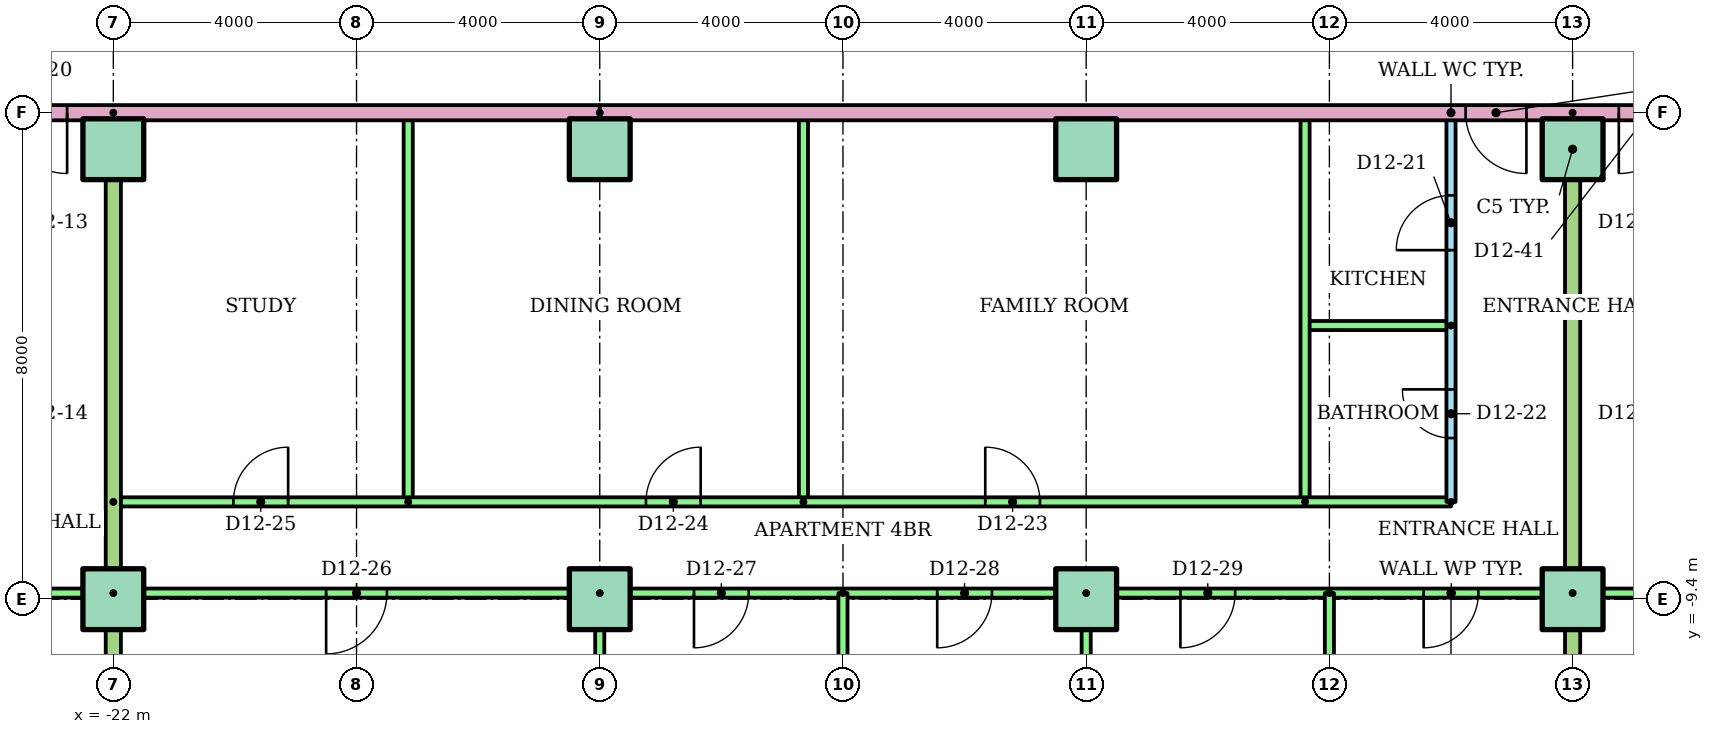
"""IFC4 building model, lengths in metres.
Left out: names, types, materials, properties, quantities, classifications, styles, units other than length and angle.
Written with IfcOpenShell. Run it as: python <this file> out.ifc"""

import sys

from ifc_helpers import new_model, si_unit, direction, frame, frame_2d, origin, origin_2d, place, context, subcontext, project, spatial, rectangle, extrude, element, fill, save


model = new_model("IFC4")
c1 = context("Model", 3, precision=1e-05, world=origin(), true_north=direction((0.0, 1.0)))
c2 = subcontext(c1, "Body", "Model", "MODEL_VIEW")
j1 = project(units=[si_unit("LENGTHUNIT", "METRE"), si_unit("PLANEANGLEUNIT", "RADIAN")], contexts=[c1])
p1 = place(None, origin())
s1 = spatial("IfcSite", under=j1, at=p1, CompositionType="ELEMENT")
p2 = place(p1, origin())
s2 = spatial("IfcBuilding", under=s1, at=p2, CompositionType="ELEMENT")
p3 = place(p2, frame((0.0, 0.0, 48.0)))
s3 = spatial("IfcBuildingStorey", under=s2, at=p3, CompositionType="ELEMENT", Elevation=48.0)
for number, where in (
    (1, (-22.0, -9.4, 0.0)),
    (2, (-14.0, -9.4, 0.0)),
    (3, (-6.0, -9.4, 0.0)),
    (4, (2.0, -9.4, 0.0)),
    (5, (-22.0, -2.0, 0.0)),
    (6, (-14.0, -2.0, 0.0)),
    (7, (-6.0, -2.0, 0.0)),
    (8, (2.0, -2.0, 0.0)),
):
    element("IfcColumn", number, at=place(p3, frame(where)), inside=s3, PredefinedType="COLUMN", context=c2, shape_type="SweptSolid", body=[
        extrude(rectangle(XDim=1.0, YDim=1.0, at=origin_2d()), origin(), (0.0, 0.0, 1.0), 3.2),
    ])
p4 = place(p3, frame((-22.0, -9.3, 0.0), z_axis=(0.0, 0.0, 1.0), x_axis=(-1.0, 0.0, 0.0)))
e9 = element("IfcWall", 9, at=p4, inside=s3, PredefinedType="PARTITIONING", context=c2, shape_type="SweptSolid", body=[
    extrude(rectangle(XDim=14.51, YDim=0.15, at=frame_2d((7.255, 0.0))), origin(), (0.0, 0.0, 1.0), 2.4),
])
p5 = place(p4, frame((11.6, 0.0, 0.0)))
e10 = element("IfcOpeningElement", 10, at=p5, cuts=e9, PredefinedType="OPENING", context=c2, shape_type="SweptSolid", body=[
    extrude(rectangle(XDim=0.9, YDim=2.1, at=frame_2d((0.45, 1.05))), frame((0.0, 0.085, 0.0), z_axis=(0.0, -1.0, 0.0), x_axis=(1.0, 0.0, 0.0)), (0.0, 0.0, 1.0), 0.17),
])
p6 = place(p4, frame((6.34, 0.0, 0.0)))
e11 = element("IfcOpeningElement", 11, at=p6, cuts=e9, PredefinedType="OPENING", context=c2, shape_type="SweptSolid", body=[
    extrude(rectangle(XDim=0.9, YDim=2.1, at=frame_2d((0.45, 1.05))), frame((0.0, 0.085, 0.0), z_axis=(0.0, -1.0, 0.0), x_axis=(1.0, 0.0, 0.0)), (0.0, 0.0, 1.0), 0.17),
])
p7 = place(p4, frame((1.5, 0.0, 0.0)))
e12 = element("IfcOpeningElement", 12, at=p7, cuts=e9, PredefinedType="OPENING", context=c2, shape_type="SweptSolid", body=[
    extrude(rectangle(XDim=1.0, YDim=2.1, at=frame_2d((0.5, 1.05))), frame((0.0, 0.085, 0.0), z_axis=(0.0, -1.0, 0.0), x_axis=(1.0, 0.0, 0.0)), (0.0, 0.0, 1.0), 0.17),
])
p8 = place(p3, frame((0.0, -7.8, 0.0), z_axis=(0.0, 0.0, 1.0), x_axis=(0.0, 1.0, 0.0)))
e13 = element("IfcWall", 13, at=p8, inside=s3, PredefinedType="PARTITIONING", context=c2, shape_type="SweptSolid", body=[
    extrude(rectangle(XDim=6.4, YDim=0.15, at=frame_2d((3.2, 0.0))), origin(), (0.0, 0.0, 1.0), 2.4),
])
p9 = place(p8, frame((4.14, 0.0, 0.0)))
e14 = element("IfcOpeningElement", 14, at=p9, cuts=e13, PredefinedType="OPENING", context=c2, shape_type="SweptSolid", body=[
    extrude(rectangle(XDim=0.9, YDim=2.1, at=frame_2d((0.45, 1.05))), frame((0.0, 0.085, 0.0), z_axis=(0.0, -1.0, 0.0), x_axis=(1.0, 0.0, 0.0)), (0.0, 0.0, 1.0), 0.17),
])
p10 = place(p8, frame((1.05, 0.0, 0.0)))
e15 = element("IfcOpeningElement", 15, at=p10, cuts=e13, PredefinedType="OPENING", context=c2, shape_type="SweptSolid", body=[
    extrude(rectangle(XDim=0.8, YDim=2.1, at=frame_2d((0.4, 1.05))), frame((0.0, 0.085, 0.0), z_axis=(0.0, -1.0, 0.0), x_axis=(1.0, 0.0, 0.0)), (0.0, 0.0, 1.0), 0.17),
])
p11 = place(p3, frame((0.0, -4.9, 0.0), z_axis=(0.0, 0.0, 1.0), x_axis=(-1.0, 0.0, 0.0)))
e16 = element("IfcWall", 16, at=p11, inside=s3, PredefinedType="PARTITIONING", context=c2, shape_type="SweptSolid", body=[
    extrude(rectangle(XDim=2.4, YDim=0.15, at=frame_2d((1.2, 0.0))), origin(), (0.0, 0.0, 1.0), 2.4),
])
for number, where, z_axis, x_axis in (
    (17, (-2.4, -7.8, 0.0), (0.0, 0.0, 1.0), (0.0, 1.0, 0.0)),
    (18, (-10.65, -7.8, 0.0), (0.0, 0.0, 1.0), (0.0, 1.0, 0.0)),
    (19, (-17.15, -7.8, 0.0), (0.0, 0.0, 1.0), (0.0, 1.0, 0.0)),
):
    element("IfcWall", number, at=place(p3, frame(where, z_axis=z_axis, x_axis=x_axis)), inside=s3, PredefinedType="PARTITIONING", context=c2, shape_type="SweptSolid", body=[
        extrude(rectangle(XDim=6.4, YDim=0.15, at=frame_2d((3.2, 0.0))), origin(), (0.0, 0.0, 1.0), 2.4),
    ])
p12 = place(p3, frame((-22.0, -7.8, 0.0)))
e20 = element("IfcWall", 20, at=p12, inside=s3, PredefinedType="PARTITIONING", context=c2, shape_type="SweptSolid", body=[
    extrude(rectangle(XDim=22.0, YDim=0.15, at=frame_2d((11.0, 0.0))), origin(), (0.0, 0.0, 1.0), 2.4),
])
p13 = place(p12, frame((14.34, 0.0, 0.0)))
e21 = element("IfcOpeningElement", 21, at=p13, cuts=e20, PredefinedType="OPENING", context=c2, shape_type="SweptSolid", body=[
    extrude(rectangle(XDim=0.9, YDim=2.1, at=frame_2d((0.45, 1.05))), frame((0.0, 0.085, 0.0), z_axis=(0.0, -1.0, 0.0), x_axis=(1.0, 0.0, 0.0)), (0.0, 0.0, 1.0), 0.17),
])
p14 = place(p12, frame((8.76, 0.0, 0.0)))
e22 = element("IfcOpeningElement", 22, at=p14, cuts=e20, PredefinedType="OPENING", context=c2, shape_type="SweptSolid", body=[
    extrude(rectangle(XDim=0.9, YDim=2.1, at=frame_2d((0.45, 1.05))), frame((0.0, 0.085, 0.0), z_axis=(0.0, -1.0, 0.0), x_axis=(1.0, 0.0, 0.0)), (0.0, 0.0, 1.0), 0.17),
])
p15 = place(p12, frame((1.975, 0.0, 0.0)))
e23 = element("IfcOpeningElement", 23, at=p15, cuts=e20, PredefinedType="OPENING", context=c2, shape_type="SweptSolid", body=[
    extrude(rectangle(XDim=0.9, YDim=2.1, at=frame_2d((0.45, 1.05))), frame((0.0, 0.085, 0.0), z_axis=(0.0, -1.0, 0.0), x_axis=(1.0, 0.0, 0.0)), (0.0, 0.0, 1.0), 0.17),
])
p16 = place(p3, frame((2.0, -9.3, 0.0), z_axis=(0.0, 0.0, 1.0), x_axis=(-1.0, 0.0, 0.0)))
e24 = element("IfcWall", 24, at=p16, inside=s3, PredefinedType="PARTITIONING", context=c2, shape_type="SweptSolid", body=[
    extrude(rectangle(XDim=24.0, YDim=0.15, at=frame_2d((12.0, 0.0))), origin(), (0.0, 0.0, 1.0), 2.4),
])
p17 = place(p16, frame((19.5, 0.0, 0.0)))
e25 = element("IfcOpeningElement", 25, at=p17, cuts=e24, PredefinedType="OPENING", context=c2, shape_type="SweptSolid", body=[
    extrude(rectangle(XDim=1.0, YDim=2.1, at=frame_2d((0.5, 1.05))), frame((0.0, 0.085, 0.0), z_axis=(0.0, -1.0, 0.0), x_axis=(1.0, 0.0, 0.0)), (0.0, 0.0, 1.0), 0.17),
])
p18 = place(p16, frame((13.55, 0.0, 0.0)))
e26 = element("IfcOpeningElement", 26, at=p18, cuts=e24, PredefinedType="OPENING", context=c2, shape_type="SweptSolid", body=[
    extrude(rectangle(XDim=0.9, YDim=2.1, at=frame_2d((0.45, 1.05))), frame((0.0, 0.085, 0.0), z_axis=(0.0, -1.0, 0.0), x_axis=(1.0, 0.0, 0.0)), (0.0, 0.0, 1.0), 0.17),
])
p19 = place(p16, frame((9.55, 0.0, 0.0)))
e27 = element("IfcOpeningElement", 27, at=p19, cuts=e24, PredefinedType="OPENING", context=c2, shape_type="SweptSolid", body=[
    extrude(rectangle(XDim=0.9, YDim=2.1, at=frame_2d((0.45, 1.05))), frame((0.0, 0.085, 0.0), z_axis=(0.0, -1.0, 0.0), x_axis=(1.0, 0.0, 0.0)), (0.0, 0.0, 1.0), 0.17),
])
p20 = place(p16, frame((5.55, 0.0, 0.0)))
e28 = element("IfcOpeningElement", 28, at=p20, cuts=e24, PredefinedType="OPENING", context=c2, shape_type="SweptSolid", body=[
    extrude(rectangle(XDim=0.9, YDim=2.1, at=frame_2d((0.45, 1.05))), frame((0.0, 0.085, 0.0), z_axis=(0.0, -1.0, 0.0), x_axis=(1.0, 0.0, 0.0)), (0.0, 0.0, 1.0), 0.17),
])
p21 = place(p16, frame((1.55, 0.0, 0.0)))
e29 = element("IfcOpeningElement", 29, at=p21, cuts=e24, PredefinedType="OPENING", context=c2, shape_type="SweptSolid", body=[
    extrude(rectangle(XDim=0.9, YDim=2.1, at=frame_2d((0.45, 1.05))), frame((0.0, 0.085, 0.0), z_axis=(0.0, -1.0, 0.0), x_axis=(1.0, 0.0, 0.0)), (0.0, 0.0, 1.0), 0.17),
])
p22 = place(p3, frame((-14.0, -9.3, 0.0), z_axis=(0.0, 0.0, 1.0), x_axis=(0.0, -1.0, 0.0)))
e30 = element("IfcWall", 30, at=p22, inside=s3, PredefinedType="PARTITIONING", context=c2, shape_type="SweptSolid", body=[
    extrude(rectangle(XDim=6.81, YDim=0.15, at=frame_2d((3.405, 0.0))), origin(), (0.0, 0.0, 1.0), 2.4),
])
p23 = place(p3, frame((-10.0, -9.3, 0.0), z_axis=(0.0, 0.0, 1.0), x_axis=(0.0, -1.0, 0.0)))
e31 = element("IfcWall", 31, at=p23, inside=s3, PredefinedType="PARTITIONING", context=c2, shape_type="SweptSolid", body=[
    extrude(rectangle(XDim=6.821, YDim=0.15, at=frame_2d((3.411, 0.0))), origin(), (0.0, 0.0, 1.0), 2.4),
])
p24 = place(p3, frame((-6.0, -9.3, 0.0), z_axis=(0.0, 0.0, 1.0), x_axis=(0.0, -1.0, 0.0)))
e32 = element("IfcWall", 32, at=p24, inside=s3, PredefinedType="PARTITIONING", context=c2, shape_type="SweptSolid", body=[
    extrude(rectangle(XDim=6.81, YDim=0.15, at=frame_2d((3.405, 0.0))), origin(), (0.0, 0.0, 1.0), 2.4),
])
p25 = place(p3, frame((-2.0, -9.3, 0.0), z_axis=(0.0, 0.0, 1.0), x_axis=(0.0, -1.0, 0.0)))
e33 = element("IfcWall", 33, at=p25, inside=s3, PredefinedType="PARTITIONING", context=c2, shape_type="SweptSolid", body=[
    extrude(rectangle(XDim=6.821, YDim=0.15, at=frame_2d((3.411, 0.0))), origin(), (0.0, 0.0, 1.0), 2.4),
])
p26 = place(p3, frame((-22.0, -1.4, 0.0), z_axis=(0.0, 0.0, 1.0), x_axis=(0.0, -1.0, 0.0)))
e34 = element("IfcWall", 34, at=p26, inside=s3, PredefinedType="PARTITIONING", context=c2, shape_type="SweptSolid", body=[
    extrude(rectangle(XDim=14.71, YDim=0.25, at=frame_2d((7.355, 0.0))), origin(), (0.0, 0.0, 1.0), 2.4),
])
p27 = place(p3, frame((18.0, -9.3, 0.0), z_axis=(0.0, 0.0, 1.0), x_axis=(-1.0, 0.0, 0.0)))
e35 = element("IfcWall", 35, at=p27, inside=s3, PredefinedType="PARTITIONING", context=c2, shape_type="SweptSolid", body=[
    extrude(rectangle(XDim=16.0, YDim=0.15, at=frame_2d((8.0, 0.0))), origin(), (0.0, 0.0, 1.0), 2.4),
])
p28 = place(p27, frame((13.55, 0.0, 0.0)))
e36 = element("IfcOpeningElement", 36, at=p28, cuts=e35, PredefinedType="OPENING", context=c2, shape_type="SweptSolid", body=[
    extrude(rectangle(XDim=0.9, YDim=2.1, at=frame_2d((0.45, 1.05))), frame((0.0, 0.085, 0.0), z_axis=(0.0, -1.0, 0.0), x_axis=(1.0, 0.0, 0.0)), (0.0, 0.0, 1.0), 0.17),
])
p29 = place(p27, frame((9.55, 0.0, 0.0)))
e37 = element("IfcOpeningElement", 37, at=p29, cuts=e35, PredefinedType="OPENING", context=c2, shape_type="SweptSolid", body=[
    extrude(rectangle(XDim=0.9, YDim=2.1, at=frame_2d((0.45, 1.05))), frame((0.0, 0.085, 0.0), z_axis=(0.0, -1.0, 0.0), x_axis=(1.0, 0.0, 0.0)), (0.0, 0.0, 1.0), 0.17),
])
p30 = place(p27, frame((5.55, 0.0, 0.0)))
e38 = element("IfcOpeningElement", 38, at=p30, cuts=e35, PredefinedType="OPENING", context=c2, shape_type="SweptSolid", body=[
    extrude(rectangle(XDim=0.9, YDim=2.1, at=frame_2d((0.45, 1.05))), frame((0.0, 0.085, 0.0), z_axis=(0.0, -1.0, 0.0), x_axis=(1.0, 0.0, 0.0)), (0.0, 0.0, 1.0), 0.17),
])
p31 = place(p27, frame((1.5, 0.0, 0.0)))
e39 = element("IfcOpeningElement", 39, at=p31, cuts=e35, PredefinedType="OPENING", context=c2, shape_type="SweptSolid", body=[
    extrude(rectangle(XDim=1.0, YDim=2.1, at=frame_2d((0.5, 1.05))), frame((0.0, 0.085, 0.0), z_axis=(0.0, -1.0, 0.0), x_axis=(1.0, 0.0, 0.0)), (0.0, 0.0, 1.0), 0.17),
])
p32 = place(p3, frame((2.0, -1.4, 0.0), z_axis=(0.0, 0.0, 1.0), x_axis=(0.0, -1.0, 0.0)))
e40 = element("IfcWall", 40, at=p32, inside=s3, PredefinedType="PARTITIONING", context=c2, shape_type="SweptSolid", body=[
    extrude(rectangle(XDim=14.71, YDim=0.25, at=frame_2d((7.355, 0.0))), origin(), (0.0, 0.0, 1.0), 2.4),
])
p33 = place(p3, frame((-14.0, -1.4, 0.0), z_axis=(0.0, 0.0, 1.0), x_axis=(-1.0, 0.0, 0.0)))
e41 = element("IfcWall", 41, at=p33, inside=s3, PredefinedType="PARTITIONING", context=c2, shape_type="SweptSolid", body=[
    extrude(rectangle(XDim=15.0, YDim=0.25, at=frame_2d((7.5, 0.0))), origin(), (0.0, 0.0, 1.0), 2.4),
])
p34 = place(p33, frame((8.76, 0.0, 0.0)))
e42 = element("IfcOpeningElement", 42, at=p34, cuts=e41, PredefinedType="OPENING", context=c2, shape_type="SweptSolid", body=[
    extrude(rectangle(XDim=1.0, YDim=2.1, at=frame_2d((0.5, 1.05))), frame((0.0, 0.135, 0.0), z_axis=(0.0, -1.0, 0.0), x_axis=(1.0, 0.0, 0.0)), (0.0, 0.0, 1.0), 0.27),
])
p35 = place(p3, frame((14.0, -1.4, 0.0), z_axis=(0.0, 0.0, 1.0), x_axis=(-1.0, 0.0, 0.0)))
e43 = element("IfcWall", 43, at=p35, inside=s3, PredefinedType="PARTITIONING", context=c2, shape_type="SweptSolid", body=[
    extrude(rectangle(XDim=28.0, YDim=0.25, at=frame_2d((14.0, 0.0))), origin(), (0.0, 0.0, 1.0), 2.4),
])
p36 = place(p35, frame((12.76, 0.0, 0.0)))
e44 = element("IfcOpeningElement", 44, at=p36, cuts=e43, PredefinedType="OPENING", context=c2, shape_type="SweptSolid", body=[
    extrude(rectangle(XDim=1.0, YDim=2.1, at=frame_2d((0.5, 1.05))), frame((0.0, 0.135, 0.0), z_axis=(0.0, -1.0, 0.0), x_axis=(1.0, 0.0, 0.0)), (0.0, 0.0, 1.0), 0.27),
])
p37 = place(p35, frame((10.24, 0.0, 0.0)))
e45 = element("IfcOpeningElement", 45, at=p37, cuts=e43, PredefinedType="OPENING", context=c2, shape_type="SweptSolid", body=[
    extrude(rectangle(XDim=1.0, YDim=2.1, at=frame_2d((0.5, 1.05))), frame((0.0, 0.135, 0.0), z_axis=(0.0, -1.0, 0.0), x_axis=(1.0, 0.0, 0.0)), (0.0, 0.0, 1.0), 0.27),
])
p38 = place(p34, origin())
e46 = element("IfcDoor", 46, at=p38, inside=s3, OperationType="SINGLE_SWING_LEFT", PredefinedType="DOOR", context=c2, shape_type="SweptSolid", body=[
    extrude(rectangle(XDim=1.0, YDim=2.1, at=frame_2d((0.5, 1.05))), frame((0.0, 0.025, 0.0), z_axis=(0.0, -1.0, 0.0), x_axis=(1.0, 0.0, 0.0)), (0.0, 0.0, 1.0), 0.05),
])
fill(e42, e46)
p39 = place(p9, origin())
e47 = element("IfcDoor", 47, at=p39, inside=s3, OperationType="SINGLE_SWING_LEFT", PredefinedType="DOOR", context=c2, shape_type="SweptSolid", body=[
    extrude(rectangle(XDim=0.9, YDim=2.1, at=frame_2d((0.45, 1.05))), frame((0.0, 0.025, 0.0), z_axis=(0.0, -1.0, 0.0), x_axis=(1.0, 0.0, 0.0)), (0.0, 0.0, 1.0), 0.05),
])
fill(e14, e47)
p40 = place(p10, origin())
e48 = element("IfcDoor", 48, at=p40, inside=s3, OperationType="SINGLE_SWING_RIGHT", PredefinedType="DOOR", context=c2, shape_type="SweptSolid", body=[
    extrude(rectangle(XDim=0.8, YDim=2.1, at=frame_2d((0.4, 1.05))), frame((0.0, 0.025, 0.0), z_axis=(0.0, -1.0, 0.0), x_axis=(1.0, 0.0, 0.0)), (0.0, 0.0, 1.0), 0.05),
])
fill(e15, e48)
p41 = place(p13, origin())
e49 = element("IfcDoor", 49, at=p41, inside=s3, OperationType="SINGLE_SWING_LEFT", PredefinedType="DOOR", context=c2, shape_type="SweptSolid", body=[
    extrude(rectangle(XDim=0.9, YDim=2.1, at=frame_2d((0.45, 1.05))), frame((0.0, 0.025, 0.0), z_axis=(0.0, -1.0, 0.0), x_axis=(1.0, 0.0, 0.0)), (0.0, 0.0, 1.0), 0.05),
])
fill(e21, e49)
p42 = place(p14, origin())
e50 = element("IfcDoor", 50, at=p42, inside=s3, OperationType="SINGLE_SWING_RIGHT", PredefinedType="DOOR", context=c2, shape_type="SweptSolid", body=[
    extrude(rectangle(XDim=0.9, YDim=2.1, at=frame_2d((0.45, 1.05))), frame((0.0, 0.025, 0.0), z_axis=(0.0, -1.0, 0.0), x_axis=(1.0, 0.0, 0.0)), (0.0, 0.0, 1.0), 0.05),
])
fill(e22, e50)
p43 = place(p15, origin())
e51 = element("IfcDoor", 51, at=p43, inside=s3, OperationType="SINGLE_SWING_RIGHT", PredefinedType="DOOR", context=c2, shape_type="SweptSolid", body=[
    extrude(rectangle(XDim=0.9, YDim=2.1, at=frame_2d((0.45, 1.05))), frame((0.0, 0.025, 0.0), z_axis=(0.0, -1.0, 0.0), x_axis=(1.0, 0.0, 0.0)), (0.0, 0.0, 1.0), 0.05),
])
fill(e23, e51)
p44 = place(p17, origin())
e52 = element("IfcDoor", 52, at=p44, inside=s3, OperationType="SINGLE_SWING_RIGHT", PredefinedType="DOOR", context=c2, shape_type="SweptSolid", body=[
    extrude(rectangle(XDim=1.0, YDim=2.1, at=frame_2d((0.5, 1.05))), frame((0.0, 0.025, 0.0), z_axis=(0.0, -1.0, 0.0), x_axis=(1.0, 0.0, 0.0)), (0.0, 0.0, 1.0), 0.05),
])
fill(e25, e52)
p45 = place(p18, origin())
e53 = element("IfcDoor", 53, at=p45, inside=s3, OperationType="SINGLE_SWING_RIGHT", PredefinedType="DOOR", context=c2, shape_type="SweptSolid", body=[
    extrude(rectangle(XDim=0.9, YDim=2.1, at=frame_2d((0.45, 1.05))), frame((0.0, 0.025, 0.0), z_axis=(0.0, -1.0, 0.0), x_axis=(1.0, 0.0, 0.0)), (0.0, 0.0, 1.0), 0.05),
])
fill(e26, e53)
p46 = place(p19, origin())
e54 = element("IfcDoor", 54, at=p46, inside=s3, OperationType="SINGLE_SWING_RIGHT", PredefinedType="DOOR", context=c2, shape_type="SweptSolid", body=[
    extrude(rectangle(XDim=0.9, YDim=2.1, at=frame_2d((0.45, 1.05))), frame((0.0, 0.025, 0.0), z_axis=(0.0, -1.0, 0.0), x_axis=(1.0, 0.0, 0.0)), (0.0, 0.0, 1.0), 0.05),
])
fill(e27, e54)
p47 = place(p20, origin())
e55 = element("IfcDoor", 55, at=p47, inside=s3, OperationType="SINGLE_SWING_RIGHT", PredefinedType="DOOR", context=c2, shape_type="SweptSolid", body=[
    extrude(rectangle(XDim=0.9, YDim=2.1, at=frame_2d((0.45, 1.05))), frame((0.0, 0.025, 0.0), z_axis=(0.0, -1.0, 0.0), x_axis=(1.0, 0.0, 0.0)), (0.0, 0.0, 1.0), 0.05),
])
fill(e28, e55)
p48 = place(p21, origin())
e56 = element("IfcDoor", 56, at=p48, inside=s3, OperationType="SINGLE_SWING_RIGHT", PredefinedType="DOOR", context=c2, shape_type="SweptSolid", body=[
    extrude(rectangle(XDim=0.9, YDim=2.1, at=frame_2d((0.45, 1.05))), frame((0.0, 0.025, 0.0), z_axis=(0.0, -1.0, 0.0), x_axis=(1.0, 0.0, 0.0)), (0.0, 0.0, 1.0), 0.05),
])
fill(e29, e56)
p49 = place(p36, origin())
e57 = element("IfcDoor", 57, at=p49, inside=s3, OperationType="SINGLE_SWING_LEFT", PredefinedType="DOOR", context=c2, shape_type="SweptSolid", body=[
    extrude(rectangle(XDim=1.0, YDim=2.1, at=frame_2d((0.5, 1.05))), frame((0.0, 0.025, 0.0), z_axis=(0.0, -1.0, 0.0), x_axis=(1.0, 0.0, 0.0)), (0.0, 0.0, 1.0), 0.05),
])
fill(e44, e57)
p50 = place(p37, origin())
e58 = element("IfcDoor", 58, at=p50, inside=s3, OperationType="SINGLE_SWING_RIGHT", PredefinedType="DOOR", context=c2, shape_type="SweptSolid", body=[
    extrude(rectangle(XDim=1.0, YDim=2.1, at=frame_2d((0.5, 1.05))), frame((0.0, 0.025, 0.0), z_axis=(0.0, -1.0, 0.0), x_axis=(1.0, 0.0, 0.0)), (0.0, 0.0, 1.0), 0.05),
])
fill(e45, e58)
save(model, sys.argv[1])
